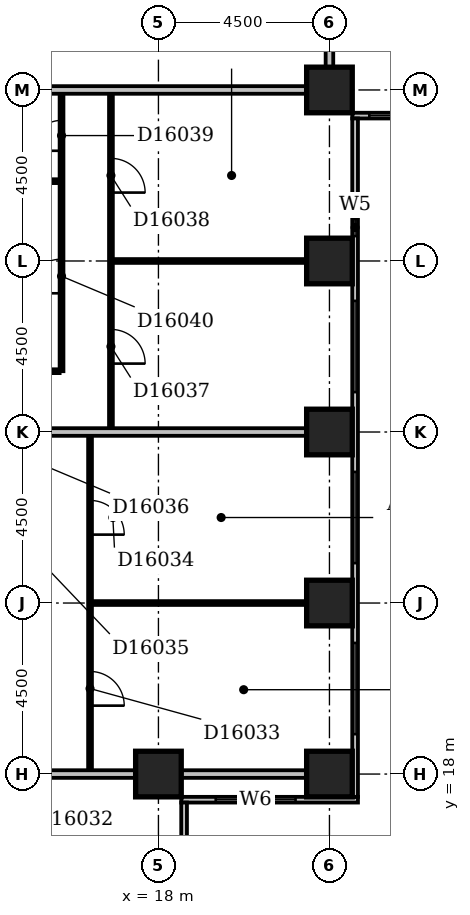
"""IFC4 building model, lengths in metres.
Left out: names, types, materials, properties, quantities, classifications, styles, units other than length and angle.
Written with IfcOpenShell. Run it as: python <this file> out.ifc"""

import sys

from ifc_helpers import new_model, si_unit, direction, frame, frame_2d, origin, origin_2d, place, context, subcontext, project, spatial, rectangle, extrude, element, fill, save


model = new_model("IFC4")
c1 = context("Model", 3, precision=1e-05, world=origin(), true_north=direction((0.0, 1.0)))
c2 = subcontext(c1, "Body", "Model", "MODEL_VIEW")
j1 = project(units=[si_unit("LENGTHUNIT", "METRE"), si_unit("PLANEANGLEUNIT", "RADIAN")], contexts=[c1])
p1 = place(None, origin())
s1 = spatial("IfcSite", under=j1, at=p1, CompositionType="ELEMENT")
p2 = place(p1, origin())
s2 = spatial("IfcBuilding", under=s1, at=p2, CompositionType="ELEMENT")
p3 = place(p2, frame((0.0, 0.0, 68.6)))
s3 = spatial("IfcBuildingStorey", under=s2, at=p3, CompositionType="ELEMENT", Elevation=68.6)
for number, where, z_axis, x_axis in (
    (1, (18.0, 18.0, -0.3), (0.0, 0.0, 1.0), (1.0, 0.0, 0.0)),
    (2, (22.5, 18.0, -0.3), (0.0, 0.0, 1.0), (1.0, 0.0, 0.0)),
    (3, (22.5, 22.5, -0.3), (0.0, 0.0, 1.0), (1.0, 0.0, 0.0)),
    (4, (22.5, 27.0, -0.3), (0.0, 0.0, 1.0), (1.0, 0.0, 0.0)),
    (5, (22.5, 31.5, -0.3), (0.0, 0.0, 1.0), (1.0, 0.0, 0.0)),
    (6, (22.5, 36.0, -0.3), (0.0, 0.0, 1.0), (1.0, 0.0, 0.0)),
):
    element("IfcColumn", number, at=place(p3, frame(where, z_axis=z_axis, x_axis=x_axis)), inside=s3, PredefinedType="COLUMN", context=c2, shape_type="SweptSolid", body=[
        extrude(rectangle(XDim=1.2, YDim=1.2, at=origin_2d()), origin(), (0.0, 0.0, 1.0), 3.6),
    ])
p4 = place(p3, frame((18.675, 8.4, 0.0), z_axis=(0.0, 0.0, 1.0), x_axis=(0.0, 1.0, 0.0)))
e7 = element("IfcWall", 7, at=p4, inside=s3, PredefinedType="STANDARD", context=c2, shape_type="SweptSolid", body=[
    extrude(rectangle(XDim=8.85, YDim=0.15, at=frame_2d((4.425, 0.0))), origin(), (0.0, 0.0, 1.0), 2.7),
])
p5 = place(p4, frame((1.65, 0.0, 0.6)))
e8 = element("IfcOpeningElement", 8, at=p5, cuts=e7, PredefinedType="OPENING", context=c2, shape_type="SweptSolid", body=[
    extrude(rectangle(XDim=2.4, YDim=1.8, at=frame_2d((1.2, 0.9))), frame((0.0, 0.087, 0.0), z_axis=(0.0, -1.0, 0.0), x_axis=(1.0, 0.0, 0.0)), (0.0, 0.0, 1.0), 0.174),
])
p6 = place(p4, frame((5.982, 0.0, 0.6)))
e9 = element("IfcOpeningElement", 9, at=p6, cuts=e7, PredefinedType="OPENING", context=c2, shape_type="SweptSolid", body=[
    extrude(rectangle(XDim=1.2, YDim=1.8, at=frame_2d((0.6, 0.9))), frame((0.0, 0.087, 0.0), z_axis=(0.0, -1.0, 0.0), x_axis=(1.0, 0.0, 0.0)), (0.0, 0.0, 1.0), 0.174),
])
p7 = place(p3, frame((18.6, 17.325, 0.0), z_axis=(0.0, 0.0, 1.0), x_axis=(1.0, 0.0, 0.0)))
e10 = element("IfcWall", 10, at=p7, inside=s3, PredefinedType="STANDARD", context=c2, shape_type="SweptSolid", body=[
    extrude(rectangle(XDim=4.65, YDim=0.15, at=frame_2d((2.325, 0.0))), origin(), (0.0, 0.0, 1.0), 2.7),
])
p8 = place(p7, frame((0.907, 0.0, 0.6)))
e11 = element("IfcOpeningElement", 11, at=p8, cuts=e10, PredefinedType="OPENING", context=c2, shape_type="SweptSolid", body=[
    extrude(rectangle(XDim=2.1, YDim=1.8, at=frame_2d((1.05, 0.9))), frame((0.0, 0.087, 0.0), z_axis=(0.0, -1.0, 0.0), x_axis=(1.0, 0.0, 0.0)), (0.0, 0.0, 1.0), 0.174),
])
p9 = place(p3, frame((23.175, 17.4, 0.0), z_axis=(0.0, 0.0, 1.0), x_axis=(0.0, 1.0, 0.0)))
e12 = element("IfcWall", 12, at=p9, inside=s3, PredefinedType="STANDARD", context=c2, shape_type="SweptSolid", body=[
    extrude(rectangle(XDim=17.85, YDim=0.15, at=frame_2d((8.925, 0.0))), origin(), (0.0, 0.0, 1.0), 2.7),
])
p10 = place(p9, frame((1.65, 0.0, 0.6)))
e13 = element("IfcOpeningElement", 13, at=p10, cuts=e12, PredefinedType="OPENING", context=c2, shape_type="SweptSolid", body=[
    extrude(rectangle(XDim=2.4, YDim=1.8, at=frame_2d((1.2, 0.9))), frame((0.0, 0.087, 0.0), z_axis=(0.0, -1.0, 0.0), x_axis=(1.0, 0.0, 0.0)), (0.0, 0.0, 1.0), 0.174),
])
p11 = place(p9, frame((6.15, 0.0, 0.6)))
e14 = element("IfcOpeningElement", 14, at=p11, cuts=e12, PredefinedType="OPENING", context=c2, shape_type="SweptSolid", body=[
    extrude(rectangle(XDim=2.4, YDim=1.8, at=frame_2d((1.2, 0.9))), frame((0.0, 0.087, 0.0), z_axis=(0.0, -1.0, 0.0), x_axis=(1.0, 0.0, 0.0)), (0.0, 0.0, 1.0), 0.174),
])
p12 = place(p9, frame((10.65, 0.0, 0.6)))
e15 = element("IfcOpeningElement", 15, at=p12, cuts=e12, PredefinedType="OPENING", context=c2, shape_type="SweptSolid", body=[
    extrude(rectangle(XDim=2.4, YDim=1.8, at=frame_2d((1.2, 0.9))), frame((0.0, 0.087, 0.0), z_axis=(0.0, -1.0, 0.0), x_axis=(1.0, 0.0, 0.0)), (0.0, 0.0, 1.0), 0.174),
])
p13 = place(p9, frame((14.756, 0.0, 0.6)))
e16 = element("IfcOpeningElement", 16, at=p13, cuts=e12, PredefinedType="OPENING", context=c2, shape_type="SweptSolid", body=[
    extrude(rectangle(XDim=0.45, YDim=1.8, at=frame_2d((0.225, 0.9))), frame((0.0, 0.087, 0.0), z_axis=(0.0, -1.0, 0.0), x_axis=(1.0, 0.0, 0.0)), (0.0, 0.0, 1.0), 0.174),
])
p14 = place(p3, frame((23.1, 35.325, 0.0), z_axis=(0.0, 0.0, 1.0), x_axis=(1.0, 0.0, 0.0)))
e17 = element("IfcWall", 17, at=p14, inside=s3, PredefinedType="STANDARD", context=c2, shape_type="SweptSolid", body=[
    extrude(rectangle(XDim=45.15, YDim=0.15, at=frame_2d((22.575, 0.0))), origin(), (0.0, 0.0, 1.0), 2.7),
])
p15 = place(p14, frame((0.45, 0.0, 0.6)))
e18 = element("IfcOpeningElement", 18, at=p15, cuts=e17, PredefinedType="OPENING", context=c2, shape_type="SweptSolid", body=[
    extrude(rectangle(XDim=2.4, YDim=1.8, at=frame_2d((1.2, 0.9))), frame((0.0, 0.087, 0.0), z_axis=(0.0, -1.0, 0.0), x_axis=(1.0, 0.0, 0.0)), (0.0, 0.0, 1.0), 0.174),
])
p16 = place(p14, frame((4.95, 0.0, 0.6)))
e19 = element("IfcOpeningElement", 19, at=p16, cuts=e17, PredefinedType="OPENING", context=c2, shape_type="SweptSolid", body=[
    extrude(rectangle(XDim=2.4, YDim=1.8, at=frame_2d((1.2, 0.9))), frame((0.0, 0.087, 0.0), z_axis=(0.0, -1.0, 0.0), x_axis=(1.0, 0.0, 0.0)), (0.0, 0.0, 1.0), 0.174),
])
p17 = place(p14, frame((9.243, 0.0, 0.6)))
e20 = element("IfcOpeningElement", 20, at=p17, cuts=e17, PredefinedType="OPENING", context=c2, shape_type="SweptSolid", body=[
    extrude(rectangle(XDim=1.8, YDim=1.8, at=frame_2d((0.9, 0.9))), frame((0.0, 0.087, 0.0), z_axis=(0.0, -1.0, 0.0), x_axis=(1.0, 0.0, 0.0)), (0.0, 0.0, 1.0), 0.174),
])
p18 = place(p14, frame((14.97, 0.0, 0.6)))
e21 = element("IfcOpeningElement", 21, at=p18, cuts=e17, PredefinedType="OPENING", context=c2, shape_type="SweptSolid", body=[
    extrude(rectangle(XDim=1.5, YDim=1.8, at=frame_2d((0.75, 0.9))), frame((0.0, 0.087, 0.0), z_axis=(0.0, -1.0, 0.0), x_axis=(1.0, 0.0, 0.0)), (0.0, 0.0, 1.0), 0.174),
])
p19 = place(p14, frame((18.45, 0.0, 0.6)))
e22 = element("IfcOpeningElement", 22, at=p19, cuts=e17, PredefinedType="OPENING", context=c2, shape_type="SweptSolid", body=[
    extrude(rectangle(XDim=2.4, YDim=1.8, at=frame_2d((1.2, 0.9))), frame((0.0, 0.087, 0.0), z_axis=(0.0, -1.0, 0.0), x_axis=(1.0, 0.0, 0.0)), (0.0, 0.0, 1.0), 0.174),
])
p20 = place(p14, frame((22.95, 0.0, 0.6)))
e23 = element("IfcOpeningElement", 23, at=p20, cuts=e17, PredefinedType="OPENING", context=c2, shape_type="SweptSolid", body=[
    extrude(rectangle(XDim=2.4, YDim=1.8, at=frame_2d((1.2, 0.9))), frame((0.0, 0.087, 0.0), z_axis=(0.0, -1.0, 0.0), x_axis=(1.0, 0.0, 0.0)), (0.0, 0.0, 1.0), 0.174),
])
p21 = place(p14, frame((27.45, 0.0, 0.6)))
e24 = element("IfcOpeningElement", 24, at=p21, cuts=e17, PredefinedType="OPENING", context=c2, shape_type="SweptSolid", body=[
    extrude(rectangle(XDim=2.4, YDim=1.8, at=frame_2d((1.2, 0.9))), frame((0.0, 0.087, 0.0), z_axis=(0.0, -1.0, 0.0), x_axis=(1.0, 0.0, 0.0)), (0.0, 0.0, 1.0), 0.174),
])
p22 = place(p14, frame((31.95, 0.0, 0.6)))
e25 = element("IfcOpeningElement", 25, at=p22, cuts=e17, PredefinedType="OPENING", context=c2, shape_type="SweptSolid", body=[
    extrude(rectangle(XDim=2.4, YDim=1.8, at=frame_2d((1.2, 0.9))), frame((0.0, 0.087, 0.0), z_axis=(0.0, -1.0, 0.0), x_axis=(1.0, 0.0, 0.0)), (0.0, 0.0, 1.0), 0.174),
])
p23 = place(p14, frame((36.45, 0.0, 0.6)))
e26 = element("IfcOpeningElement", 26, at=p23, cuts=e17, PredefinedType="OPENING", context=c2, shape_type="SweptSolid", body=[
    extrude(rectangle(XDim=2.4, YDim=1.8, at=frame_2d((1.2, 0.9))), frame((0.0, 0.087, 0.0), z_axis=(0.0, -1.0, 0.0), x_axis=(1.0, 0.0, 0.0)), (0.0, 0.0, 1.0), 0.174),
])
p24 = place(p14, frame((40.706, 0.0, 0.6)))
e27 = element("IfcOpeningElement", 27, at=p24, cuts=e17, PredefinedType="OPENING", context=c2, shape_type="SweptSolid", body=[
    extrude(rectangle(XDim=1.2, YDim=1.8, at=frame_2d((0.6, 0.9))), frame((0.0, 0.087, 0.0), z_axis=(0.0, -1.0, 0.0), x_axis=(1.0, 0.0, 0.0)), (0.0, 0.0, 1.0), 0.174),
])
p25 = place(p3, frame((9.1, 18.0, 0.0), z_axis=(0.0, 0.0, 1.0), x_axis=(1.0, 0.0, 0.0)))
e28 = element("IfcWall", 28, at=p25, inside=s3, PredefinedType="PARTITIONING", context=c2, shape_type="SweptSolid", body=[
    extrude(rectangle(XDim=8.3, YDim=0.2, at=frame_2d((4.15, 0.0))), origin(), (0.0, 0.0, 1.0), 2.6),
])
p26 = place(p3, frame((18.6, 18.0, 0.0), z_axis=(0.0, 0.0, 1.0), x_axis=(1.0, 0.0, 0.0)))
e29 = element("IfcWall", 29, at=p26, inside=s3, PredefinedType="PARTITIONING", context=c2, shape_type="SweptSolid", body=[
    extrude(rectangle(XDim=3.3, YDim=0.2, at=frame_2d((1.65, 0.0))), origin(), (0.0, 0.0, 1.0), 2.7),
])
p27 = place(p3, frame((16.2, 18.1, 0.0), z_axis=(0.0, 0.0, 1.0), x_axis=(0.0, 1.0, 0.0)))
e30 = element("IfcWall", 30, at=p27, inside=s3, PredefinedType="PARTITIONING", context=c2, shape_type="SweptSolid", body=[
    extrude(rectangle(XDim=8.8, YDim=0.1, at=frame_2d((4.4, 0.0))), origin(), (0.0, 0.0, 1.0), 3.3),
])
p28 = place(p27, frame((1.7, 0.0, 0.0)))
e31 = element("IfcOpeningElement", 31, at=p28, cuts=e30, PredefinedType="OPENING", context=c2, shape_type="SweptSolid", body=[
    extrude(rectangle(XDim=0.9, YDim=2.1, at=frame_2d((0.45, 1.05))), frame((0.0, 0.062, 0.0), z_axis=(0.0, -1.0, 0.0), x_axis=(1.0, 0.0, 0.0)), (0.0, 0.0, 1.0), 0.124),
])
p29 = place(p27, frame((6.2, 0.0, 0.0)))
e32 = element("IfcOpeningElement", 32, at=p29, cuts=e30, PredefinedType="OPENING", context=c2, shape_type="SweptSolid", body=[
    extrude(rectangle(XDim=0.9, YDim=2.1, at=frame_2d((0.45, 1.05))), frame((0.0, 0.062, 0.0), z_axis=(0.0, -1.0, 0.0), x_axis=(1.0, 0.0, 0.0)), (0.0, 0.0, 1.0), 0.124),
])
p30 = place(p3, frame((16.25, 22.5, 0.0), z_axis=(0.0, 0.0, 1.0), x_axis=(1.0, 0.0, 0.0)))
e33 = element("IfcWall", 33, at=p30, inside=s3, PredefinedType="PARTITIONING", context=c2, shape_type="SweptSolid", body=[
    extrude(rectangle(XDim=5.65, YDim=0.1, at=frame_2d((2.825, 0.0))), origin(), (0.0, 0.0, 1.0), 3.3),
])
p31 = place(p3, frame((9.1, 27.0, 0.0), z_axis=(0.0, 0.0, 1.0), x_axis=(1.0, 0.0, 0.0)))
e34 = element("IfcWall", 34, at=p31, inside=s3, PredefinedType="PARTITIONING", context=c2, shape_type="SweptSolid", body=[
    extrude(rectangle(XDim=12.8, YDim=0.2, at=frame_2d((6.4, 0.0))), origin(), (0.0, 0.0, 1.0), 2.7),
])
p32 = place(p3, frame((16.75, 27.1, 0.0), z_axis=(0.0, 0.0, 1.0), x_axis=(0.0, 1.0, 0.0)))
e35 = element("IfcWall", 35, at=p32, inside=s3, PredefinedType="PARTITIONING", context=c2, shape_type="SweptSolid", body=[
    extrude(rectangle(XDim=8.8, YDim=0.1, at=frame_2d((4.4, 0.0))), origin(), (0.0, 0.0, 1.0), 3.3),
])
p33 = place(p32, frame((1.7, 0.0, 0.0)))
e36 = element("IfcOpeningElement", 36, at=p33, cuts=e35, PredefinedType="OPENING", context=c2, shape_type="SweptSolid", body=[
    extrude(rectangle(XDim=0.9, YDim=2.1, at=frame_2d((0.45, 1.05))), frame((0.0, 0.062, 0.0), z_axis=(0.0, -1.0, 0.0), x_axis=(1.0, 0.0, 0.0)), (0.0, 0.0, 1.0), 0.124),
])
p34 = place(p32, frame((6.2, 0.0, 0.0)))
e37 = element("IfcOpeningElement", 37, at=p34, cuts=e35, PredefinedType="OPENING", context=c2, shape_type="SweptSolid", body=[
    extrude(rectangle(XDim=0.9, YDim=2.1, at=frame_2d((0.45, 1.05))), frame((0.0, 0.062, 0.0), z_axis=(0.0, -1.0, 0.0), x_axis=(1.0, 0.0, 0.0)), (0.0, 0.0, 1.0), 0.124),
])
p35 = place(p3, frame((9.1, 28.6, 0.0), z_axis=(0.0, 0.0, 1.0), x_axis=(1.0, 0.0, 0.0)))
e38 = element("IfcWall", 38, at=p35, inside=s3, PredefinedType="PARTITIONING", context=c2, shape_type="SweptSolid", body=[
    extrude(rectangle(XDim=6.3, YDim=0.1, at=frame_2d((3.15, 0.0))), origin(), (0.0, 0.0, 1.0), 3.3),
])
p36 = place(p3, frame((15.45, 28.6, 0.0), z_axis=(0.0, 0.0, 1.0), x_axis=(0.0, 1.0, 0.0)))
e39 = element("IfcWall", 39, at=p36, inside=s3, PredefinedType="PARTITIONING", context=c2, shape_type="SweptSolid", body=[
    extrude(rectangle(XDim=7.3, YDim=0.1, at=frame_2d((3.65, 0.0))), origin(), (0.0, 0.0, 1.0), 3.3),
])
p37 = place(p36, frame((5.8, 0.0, 0.0)))
e40 = element("IfcOpeningElement", 40, at=p37, cuts=e39, PredefinedType="OPENING", context=c2, shape_type="SweptSolid", body=[
    extrude(rectangle(XDim=0.8, YDim=2.1, at=frame_2d((0.4, 1.05))), frame((0.0, 0.062, 0.0), z_axis=(0.0, -1.0, 0.0), x_axis=(1.0, 0.0, 0.0)), (0.0, 0.0, 1.0), 0.124),
])
p38 = place(p36, frame((2.05, 0.0, 0.0)))
e41 = element("IfcOpeningElement", 41, at=p38, cuts=e39, PredefinedType="OPENING", context=c2, shape_type="SweptSolid", body=[
    extrude(rectangle(XDim=0.9, YDim=2.1, at=frame_2d((0.45, 1.05))), frame((0.0, 0.062, 0.0), z_axis=(0.0, -1.0, 0.0), x_axis=(1.0, 0.0, 0.0)), (0.0, 0.0, 1.0), 0.124),
])
p39 = place(p3, frame((16.8, 31.5, 0.0), z_axis=(0.0, 0.0, 1.0), x_axis=(1.0, 0.0, 0.0)))
e42 = element("IfcWall", 42, at=p39, inside=s3, PredefinedType="PARTITIONING", context=c2, shape_type="SweptSolid", body=[
    extrude(rectangle(XDim=5.1, YDim=0.1, at=frame_2d((2.55, 0.0))), origin(), (0.0, 0.0, 1.0), 3.3),
])
p40 = place(p3, frame((9.1, 33.6, 0.0), z_axis=(0.0, 0.0, 1.0), x_axis=(1.0, 0.0, 0.0)))
e43 = element("IfcWall", 43, at=p40, inside=s3, PredefinedType="PLUMBINGWALL", context=c2, shape_type="SweptSolid", body=[
    extrude(rectangle(XDim=6.3, YDim=0.1, at=frame_2d((3.15, 0.0))), origin(), (0.0, 0.0, 1.0), 3.3),
])
p41 = place(p3, frame((9.1, 36.0, 0.0), z_axis=(0.0, 0.0, 1.0), x_axis=(1.0, 0.0, 0.0)))
e44 = element("IfcWall", 44, at=p41, inside=s3, PredefinedType="PARTITIONING", context=c2, shape_type="SweptSolid", body=[
    extrude(rectangle(XDim=12.8, YDim=0.2, at=frame_2d((6.4, 0.0))), origin(), (0.0, 0.0, 1.0), 2.4),
])
p42 = place(p3, frame((22.5, 36.6, 0.0), z_axis=(0.0, 0.0, 1.0), x_axis=(0.0, 1.0, 0.0)))
e45 = element("IfcWall", 45, at=p42, inside=s3, PredefinedType="PARTITIONING", context=c2, shape_type="SweptSolid", body=[
    extrude(rectangle(XDim=12.8, YDim=0.2, at=frame_2d((6.4, 0.0))), origin(), (0.0, 0.0, 1.0), 3.3),
])
p43 = place(p8, origin())
e46 = element("IfcWindow", 46, at=p43, inside=s3, PartitioningType="SINGLE_PANEL", PredefinedType="WINDOW", context=c2, shape_type="SweptSolid", body=[
    extrude(rectangle(XDim=2.1, YDim=1.8, at=frame_2d((1.05, 0.9))), frame((0.0, 0.03, 0.0), z_axis=(0.0, -1.0, 0.0), x_axis=(1.0, 0.0, 0.0)), (0.0, 0.0, 1.0), 0.06),
])
fill(e11, e46)
p44 = place(p10, origin())
e47 = element("IfcWindow", 47, at=p44, inside=s3, PartitioningType="SINGLE_PANEL", PredefinedType="WINDOW", context=c2, shape_type="SweptSolid", body=[
    extrude(rectangle(XDim=2.4, YDim=1.8, at=frame_2d((1.2, 0.9))), frame((0.0, 0.03, 0.0), z_axis=(0.0, -1.0, 0.0), x_axis=(1.0, 0.0, 0.0)), (0.0, 0.0, 1.0), 0.06),
])
fill(e13, e47)
p45 = place(p11, origin())
e48 = element("IfcWindow", 48, at=p45, inside=s3, PartitioningType="SINGLE_PANEL", PredefinedType="WINDOW", context=c2, shape_type="SweptSolid", body=[
    extrude(rectangle(XDim=2.4, YDim=1.8, at=frame_2d((1.2, 0.9))), frame((0.0, 0.03, 0.0), z_axis=(0.0, -1.0, 0.0), x_axis=(1.0, 0.0, 0.0)), (0.0, 0.0, 1.0), 0.06),
])
fill(e14, e48)
p46 = place(p12, origin())
e49 = element("IfcWindow", 49, at=p46, inside=s3, PartitioningType="SINGLE_PANEL", PredefinedType="WINDOW", context=c2, shape_type="SweptSolid", body=[
    extrude(rectangle(XDim=2.4, YDim=1.8, at=frame_2d((1.2, 0.9))), frame((0.0, 0.03, 0.0), z_axis=(0.0, -1.0, 0.0), x_axis=(1.0, 0.0, 0.0)), (0.0, 0.0, 1.0), 0.06),
])
fill(e15, e49)
p47 = place(p13, origin())
e50 = element("IfcWindow", 50, at=p47, inside=s3, PartitioningType="SINGLE_PANEL", PredefinedType="WINDOW", context=c2, shape_type="SweptSolid", body=[
    extrude(rectangle(XDim=0.45, YDim=1.8, at=frame_2d((0.225, 0.9))), frame((0.0, 0.03, 0.0), z_axis=(0.0, -1.0, 0.0), x_axis=(1.0, 0.0, 0.0)), (0.0, 0.0, 1.0), 0.06),
])
fill(e16, e50)
p48 = place(p15, origin())
e51 = element("IfcWindow", 51, at=p48, inside=s3, PartitioningType="SINGLE_PANEL", PredefinedType="WINDOW", context=c2, shape_type="SweptSolid", body=[
    extrude(rectangle(XDim=2.4, YDim=1.8, at=frame_2d((1.2, 0.9))), frame((0.0, 0.03, 0.0), z_axis=(0.0, -1.0, 0.0), x_axis=(1.0, 0.0, 0.0)), (0.0, 0.0, 1.0), 0.06),
])
fill(e18, e51)
p49 = place(p28, frame((0.9, 0.0, 0.0), z_axis=(0.0, 0.0, 1.0), x_axis=(-1.0, 0.0, 0.0)))
e52 = element("IfcDoor", 52, at=p49, inside=s3, OperationType="SINGLE_SWING_RIGHT", PredefinedType="DOOR", context=c2, shape_type="SweptSolid", body=[
    extrude(rectangle(XDim=0.9, YDim=2.1, at=frame_2d((0.45, 1.05))), frame((0.0, 0.025, 0.0), z_axis=(0.0, -1.0, 0.0), x_axis=(1.0, 0.0, 0.0)), (0.0, 0.0, 1.0), 0.05),
])
fill(e31, e52)
p50 = place(p29, frame((0.9, 0.0, 0.0), z_axis=(0.0, 0.0, 1.0), x_axis=(-1.0, 0.0, 0.0)))
e53 = element("IfcDoor", 53, at=p50, inside=s3, OperationType="SINGLE_SWING_RIGHT", PredefinedType="DOOR", context=c2, shape_type="SweptSolid", body=[
    extrude(rectangle(XDim=0.9, YDim=2.1, at=frame_2d((0.45, 1.05))), frame((0.0, 0.025, 0.0), z_axis=(0.0, -1.0, 0.0), x_axis=(1.0, 0.0, 0.0)), (0.0, 0.0, 1.0), 0.05),
])
fill(e32, e53)
p51 = place(p33, frame((0.9, 0.0, 0.0), z_axis=(0.0, 0.0, 1.0), x_axis=(-1.0, 0.0, 0.0)))
e54 = element("IfcDoor", 54, at=p51, inside=s3, OperationType="SINGLE_SWING_RIGHT", PredefinedType="DOOR", context=c2, shape_type="SweptSolid", body=[
    extrude(rectangle(XDim=0.9, YDim=2.1, at=frame_2d((0.45, 1.05))), frame((0.0, 0.025, 0.0), z_axis=(0.0, -1.0, 0.0), x_axis=(1.0, 0.0, 0.0)), (0.0, 0.0, 1.0), 0.05),
])
fill(e36, e54)
p52 = place(p34, frame((0.9, 0.0, 0.0), z_axis=(0.0, 0.0, 1.0), x_axis=(-1.0, 0.0, 0.0)))
e55 = element("IfcDoor", 55, at=p52, inside=s3, OperationType="SINGLE_SWING_RIGHT", PredefinedType="DOOR", context=c2, shape_type="SweptSolid", body=[
    extrude(rectangle(XDim=0.9, YDim=2.1, at=frame_2d((0.45, 1.05))), frame((0.0, 0.025, 0.0), z_axis=(0.0, -1.0, 0.0), x_axis=(1.0, 0.0, 0.0)), (0.0, 0.0, 1.0), 0.05),
])
fill(e37, e55)
p53 = place(p37, origin())
e56 = element("IfcDoor", 56, at=p53, inside=s3, OperationType="SINGLE_SWING_LEFT", PredefinedType="DOOR", context=c2, shape_type="SweptSolid", body=[
    extrude(rectangle(XDim=0.8, YDim=2.1, at=frame_2d((0.4, 1.05))), frame((0.0, 0.025, 0.0), z_axis=(0.0, -1.0, 0.0), x_axis=(1.0, 0.0, 0.0)), (0.0, 0.0, 1.0), 0.05),
])
fill(e40, e56)
p54 = place(p38, origin())
e57 = element("IfcDoor", 57, at=p54, inside=s3, OperationType="SINGLE_SWING_LEFT", PredefinedType="DOOR", context=c2, shape_type="SweptSolid", body=[
    extrude(rectangle(XDim=0.9, YDim=2.1, at=frame_2d((0.45, 1.05))), frame((0.0, 0.025, 0.0), z_axis=(0.0, -1.0, 0.0), x_axis=(1.0, 0.0, 0.0)), (0.0, 0.0, 1.0), 0.05),
])
fill(e41, e57)
save(model, sys.argv[1])
